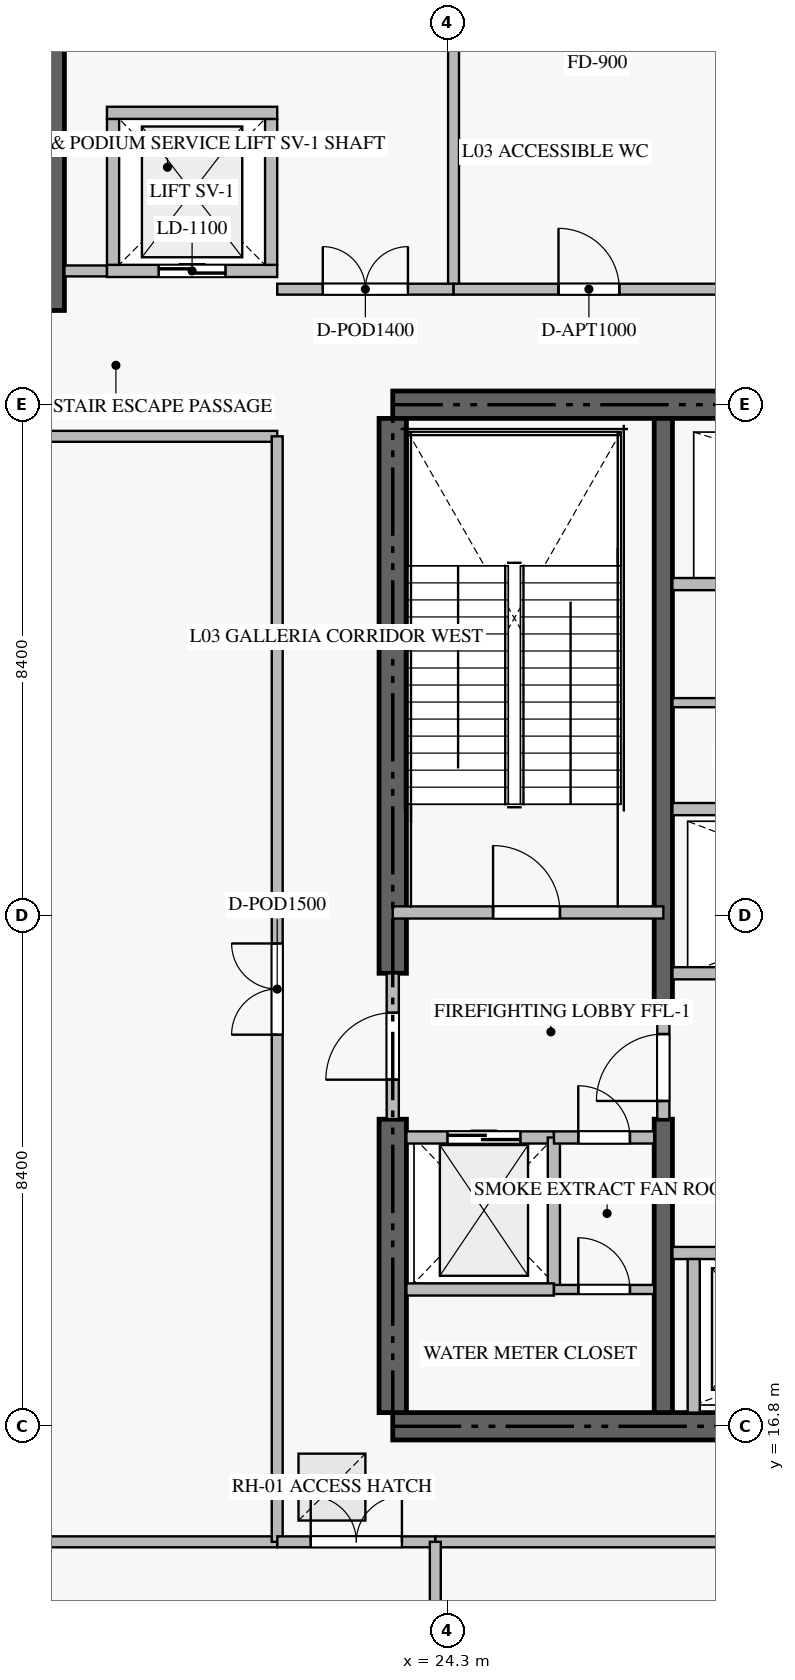
"""IFC4 building model, lengths in metres.
Left out: names, types, materials, properties, quantities, classifications, styles, units other than length and angle.
Written with IfcOpenShell. Run it as: python <this file> out.ifc"""

import sys

from ifc_helpers import new_model, si_unit, direction, frame, frame_2d, origin, origin_2d, place, context, subcontext, project, spatial, rectangle, extrude, source, transform, mapped, element, fill, save


model = new_model("IFC4")
c1 = context("Model", 3, precision=1e-05, world=origin(), true_north=direction((0.0, 1.0)))
c2 = subcontext(c1, "Body", "Model", "MODEL_VIEW")
j1 = project(units=[si_unit("LENGTHUNIT", "METRE"), si_unit("PLANEANGLEUNIT", "RADIAN")], contexts=[c1])
p1 = place(None, origin())
s1 = spatial("IfcSite", under=j1, at=p1, CompositionType="ELEMENT")
p2 = place(p1, origin())
s2 = spatial("IfcBuilding", under=s1, at=p2, CompositionType="ELEMENT")
p3 = place(p2, frame((0.0, 0.0, 15.3)))
s3 = spatial("IfcBuildingStorey", under=s2, at=p3, CompositionType="ELEMENT", Elevation=15.3)
for number, where, z_axis, x_axis in (
    (1, (23.4, 16.8, -0.38), (0.0, 0.0, 1.0), (1.0, 0.0, 0.0)),
    (2, (41.4, 33.6, -0.38), (0.0, 0.0, 1.0), (-1.0, 0.0, 0.0)),
):
    element("IfcWall", number, at=place(p3, frame(where, z_axis=z_axis, x_axis=x_axis)), inside=s3, PredefinedType="SHEAR", context=c2, shape_type="SweptSolid", body=[
        extrude(rectangle(XDim=18.0, YDim=0.45, at=frame_2d((9.0, 0.0))), origin(), (0.0, 0.0, 1.0), 5.228),
    ])
p4 = place(p3, frame((23.4, 17.025, -0.38), z_axis=(0.0, 0.0, 1.0), x_axis=(0.0, 1.0, 0.0)))
e3 = element("IfcWall", 3, at=p4, inside=s3, PredefinedType="SHEAR", context=c2, shape_type="SweptSolid", body=[
    extrude(rectangle(XDim=4.825, YDim=0.45, at=frame_2d((2.413, 0.0))), origin(), (0.0, 0.0, 1.0), 5.228),
])
p5 = place(p3, frame((23.4, 24.25, -0.38), z_axis=(0.0, 0.0, 1.0), x_axis=(0.0, 1.0, 0.0)))
e4 = element("IfcWall", 4, at=p5, inside=s3, PredefinedType="SHEAR", context=c2, shape_type="SweptSolid", body=[
    extrude(rectangle(XDim=9.125, YDim=0.45, at=frame_2d((4.562, 0.0))), origin(), (0.0, 0.0, 1.0), 5.228),
])
p6 = place(p3, frame((27.85, 17.025, -0.38), z_axis=(0.0, 0.0, 1.0), x_axis=(0.0, 1.0, 0.0)))
e5 = element("IfcWall", 5, at=p6, inside=s3, PredefinedType="SHEAR", context=c2, shape_type="SweptSolid", body=[
    extrude(rectangle(XDim=4.825, YDim=0.3, at=frame_2d((2.413, 0.0))), origin(), (0.0, 0.0, 1.0), 5.228),
])
p7 = place(p3, frame((27.85, 23.55, -0.38), z_axis=(0.0, 0.0, 1.0), x_axis=(0.0, 1.0, 0.0)))
e6 = element("IfcWall", 6, at=p7, inside=s3, PredefinedType="SHEAR", context=c2, shape_type="SweptSolid", body=[
    extrude(rectangle(XDim=9.825, YDim=0.3, at=frame_2d((4.913, 0.0))), origin(), (0.0, 0.0, 1.0), 5.228),
])
p8 = place(p3, frame((23.4, 25.25, 0.0), z_axis=(0.0, 0.0, 1.0), x_axis=(1.0, 0.0, 0.0)))
e7 = element("IfcWall", 7, at=p8, inside=s3, PredefinedType="STANDARD", context=c2, shape_type="SweptSolid", body=[
    extrude(rectangle(XDim=4.45, YDim=0.2, at=frame_2d((2.225, 0.0))), origin(), (0.0, 0.0, 1.0), 4.85),
])
p9 = place(p8, frame((1.65, 0.0, 0.0)))
e8 = element("IfcOpeningElement", 8, at=p9, cuts=e7, PredefinedType="OPENING", context=c2, shape_type="SweptSolid", body=[
    extrude(rectangle(XDim=1.1, YDim=2.15, at=frame_2d((0.55, 1.075))), frame((0.0, 0.11, 0.0), z_axis=(0.0, -1.0, 0.0), x_axis=(1.0, 0.0, 0.0)), (0.0, 0.0, 1.0), 0.22),
])
p10 = place(p3, frame((17.85, 35.15, -0.38), z_axis=(0.0, 0.0, 1.0), x_axis=(0.0, 1.0, 0.0)))
e9 = element("IfcWall", 9, at=p10, inside=s3, PredefinedType="SHEAR", context=c2, shape_type="SweptSolid", body=[
    extrude(rectangle(XDim=7.9, YDim=0.3, at=frame_2d((3.95, 0.0))), origin(), (0.0, 0.0, 1.0), 5.228),
])
p11 = place(p3, frame((23.625, 21.55, 0.0), z_axis=(0.0, 0.0, 1.0), x_axis=(1.0, 0.0, 0.0)))
e10 = element("IfcWall", 10, at=p11, inside=s3, PredefinedType="STANDARD", context=c2, shape_type="SweptSolid", body=[
    extrude(rectangle(XDim=2.425, YDim=0.2, at=frame_2d((1.212, 0.0))), origin(), (0.0, 0.0, 1.0), 4.85),
])
p12 = place(p11, frame((0.675, 0.0, 0.0)))
e11 = element("IfcOpeningElement", 11, at=p12, cuts=e10, PredefinedType="OPENING", context=c2, shape_type="SweptSolid", body=[
    extrude(rectangle(XDim=1.2, YDim=2.2, at=frame_2d((0.6, 1.1))), frame((0.0, 0.11, 0.0), z_axis=(0.0, -1.0, 0.0), x_axis=(1.0, 0.0, 0.0)), (0.0, 0.0, 1.0), 0.22),
])
p13 = place(p3, frame((28.0, 19.65, 0.0), z_axis=(0.0, 0.0, 1.0), x_axis=(1.0, 0.0, 0.0)))
e12 = element("IfcWall", 12, at=p13, inside=s3, PredefinedType="STANDARD", context=c2, shape_type="SweptSolid", body=[
    extrude(rectangle(XDim=2.65, YDim=0.2, at=frame_2d((1.325, 0.0))), origin(), (0.0, 0.0, 1.0), 4.85),
])
p14 = place(p13, frame((0.9, 0.0, 0.0)))
e13 = element("IfcOpeningElement", 13, at=p14, cuts=e12, PredefinedType="OPENING", context=c2, shape_type="SweptSolid", body=[
    extrude(rectangle(XDim=1.1, YDim=2.2, at=frame_2d((0.55, 1.1))), frame((0.0, 0.11, 0.0), z_axis=(0.0, -1.0, 0.0), x_axis=(1.0, 0.0, 0.0)), (0.0, 0.0, 1.0), 0.22),
])
p15 = place(p3, frame((28.35, 17.025, 0.0), z_axis=(0.0, 0.0, 1.0), x_axis=(0.0, 1.0, 0.0)))
e14 = element("IfcWall", 14, at=p15, inside=s3, PredefinedType="STANDARD", context=c2, shape_type="SweptSolid", body=[
    extrude(rectangle(XDim=2.525, YDim=0.2, at=frame_2d((1.263, 0.0))), origin(), (0.0, 0.0, 1.0), 4.85),
])
p16 = place(p3, frame((28.0, 24.25, 0.0), z_axis=(0.0, 0.0, 1.0), x_axis=(1.0, 0.0, 0.0)))
e15 = element("IfcWall", 15, at=p16, inside=s3, PredefinedType="STANDARD", context=c2, shape_type="SweptSolid", body=[
    extrude(rectangle(XDim=2.425, YDim=0.2, at=frame_2d((1.212, 0.0))), origin(), (0.0, 0.0, 1.0), 4.85),
])
p17 = place(p3, frame((28.0, 30.65, 0.0), z_axis=(0.0, 0.0, 1.0), x_axis=(1.0, 0.0, 0.0)))
e16 = element("IfcWall", 16, at=p17, inside=s3, PredefinedType="STANDARD", context=c2, shape_type="SweptSolid", body=[
    extrude(rectangle(XDim=2.55, YDim=0.2, at=frame_2d((1.275, 0.0))), origin(), (0.0, 0.0, 1.0), 4.85),
])
p18 = place(p3, frame((18.7, 35.8, 0.0), z_axis=(0.0, 0.0, 1.0), x_axis=(1.0, 0.0, 0.0)))
e17 = element("IfcWall", 17, at=p18, inside=s3, PredefinedType="STANDARD", context=c2, shape_type="SweptSolid", body=[
    extrude(rectangle(XDim=2.8, YDim=0.2, at=frame_2d((1.4, 0.0))), origin(), (0.0, 0.0, 1.0), 4.85),
])
p19 = place(p18, frame((0.85, 0.0, 0.0)))
e18 = element("IfcOpeningElement", 18, at=p19, cuts=e17, PredefinedType="OPENING", context=c2, shape_type="SweptSolid", body=[
    extrude(rectangle(XDim=1.1, YDim=2.2, at=frame_2d((0.55, 1.1))), frame((0.0, 0.11, 0.0), z_axis=(0.0, -1.0, 0.0), x_axis=(1.0, 0.0, 0.0)), (0.0, 0.0, 1.0), 0.22),
])
for number, where, z_axis, x_axis in (
    (19, (18.8, 35.9, 0.0), (0.0, 0.0, 1.0), (0.0, 1.0, 0.0)),
    (20, (21.4, 35.9, 0.0), (0.0, 0.0, 1.0), (0.0, 1.0, 0.0)),
):
    element("IfcWall", number, at=place(p3, frame(where, z_axis=z_axis, x_axis=x_axis)), inside=s3, PredefinedType="STANDARD", context=c2, shape_type="SweptSolid", body=[
        extrude(rectangle(XDim=2.4, YDim=0.2, at=frame_2d((1.2, 0.0))), origin(), (0.0, 0.0, 1.0), 4.85),
    ])
p20 = place(p3, frame((18.7, 38.4, 0.0), z_axis=(0.0, 0.0, 1.0), x_axis=(1.0, 0.0, 0.0)))
e21 = element("IfcWall", 21, at=p20, inside=s3, PredefinedType="STANDARD", context=c2, shape_type="SweptSolid", body=[
    extrude(rectangle(XDim=2.8, YDim=0.2, at=frame_2d((1.4, 0.0))), origin(), (0.0, 0.0, 1.0), 4.85),
])
p21 = place(p3, frame((26.05, 19.05, 0.0), z_axis=(0.0, 0.0, 1.0), x_axis=(0.0, 1.0, 0.0)))
e22 = element("IfcWall", 22, at=p21, inside=s3, PredefinedType="STANDARD", context=c2, shape_type="SweptSolid", body=[
    extrude(rectangle(XDim=2.5, YDim=0.2, at=frame_2d((1.25, 0.0))), origin(), (0.0, 0.0, 1.0), 4.85),
])
p22 = place(p3, frame((23.625, 19.05, 0.0), z_axis=(0.0, 0.0, 1.0), x_axis=(1.0, 0.0, 0.0)))
e23 = element("IfcWall", 23, at=p22, inside=s3, PredefinedType="STANDARD", context=c2, shape_type="SweptSolid", body=[
    extrude(rectangle(XDim=2.425, YDim=0.2, at=frame_2d((1.212, 0.0))), origin(), (0.0, 0.0, 1.0), 4.85),
])
p23 = place(p3, frame((26.052, 21.55, 0.0), z_axis=(0.0, 0.0, 1.0), x_axis=(1.0, 0.0, 0.0)))
e24 = element("IfcWall", 24, at=p23, inside=s3, PredefinedType="STANDARD", context=c2, shape_type="SweptSolid", body=[
    extrude(rectangle(XDim=1.648, YDim=0.2, at=frame_2d((0.824, 0.0))), origin(), (0.0, 0.0, 1.0), 4.85),
])
p24 = place(p23, frame((0.399, 0.0, 0.0)))
e25 = element("IfcOpeningElement", 25, at=p24, cuts=e24, PredefinedType="OPENING", context=c2, shape_type="SweptSolid", body=[
    extrude(rectangle(XDim=0.85, YDim=2.1, at=frame_2d((0.425, 1.05))), frame((0.0, 0.11, 0.0), z_axis=(0.0, -1.0, 0.0), x_axis=(1.0, 0.0, 0.0)), (0.0, 0.0, 1.0), 0.22),
])
p25 = place(p3, frame((23.4, 21.852, 0.0), z_axis=(0.0, 0.0, 1.0), x_axis=(0.0, 1.0, 0.0)))
e26 = element("IfcWall", 26, at=p25, inside=s3, PredefinedType="STANDARD", context=c2, shape_type="SweptSolid", body=[
    extrude(rectangle(XDim=2.396, YDim=0.2, at=frame_2d((1.198, 0.0))), origin(), (0.0, 0.0, 1.0), 4.85),
])
p26 = place(p25, frame((0.648, 0.0, 0.0)))
e27 = element("IfcOpeningElement", 27, at=p26, cuts=e26, PredefinedType="OPENING", context=c2, shape_type="SweptSolid", body=[
    extrude(rectangle(XDim=1.1, YDim=2.15, at=frame_2d((0.55, 1.075))), frame((0.0, 0.11, 0.0), z_axis=(0.0, -1.0, 0.0), x_axis=(1.0, 0.0, 0.0)), (0.0, 0.0, 1.0), 0.22),
])
p27 = place(p3, frame((27.85, 21.852, 0.0), z_axis=(0.0, 0.0, 1.0), x_axis=(0.0, 1.0, 0.0)))
e28 = element("IfcWall", 28, at=p27, inside=s3, PredefinedType="STANDARD", context=c2, shape_type="SweptSolid", body=[
    extrude(rectangle(XDim=1.696, YDim=0.2, at=frame_2d((0.848, 0.0))), origin(), (0.0, 0.0, 1.0), 4.85),
])
p28 = place(p27, frame((0.298, 0.0, 0.0)))
e29 = element("IfcOpeningElement", 29, at=p28, cuts=e28, PredefinedType="OPENING", context=c2, shape_type="SweptSolid", body=[
    extrude(rectangle(XDim=1.1, YDim=2.15, at=frame_2d((0.55, 1.075))), frame((0.0, 0.11, 0.0), z_axis=(0.0, -1.0, 0.0), x_axis=(1.0, 0.0, 0.0)), (0.0, 0.0, 1.0), 0.22),
])
p29 = place(p3, frame((28.0, 26.95, 0.0), z_axis=(0.0, 0.0, 1.0), x_axis=(1.0, 0.0, 0.0)))
e30 = element("IfcWall", 30, at=p29, inside=s3, PredefinedType="STANDARD", context=c2, shape_type="SweptSolid", body=[
    extrude(rectangle(XDim=6.95, YDim=0.2, at=frame_2d((3.475, 0.0))), origin(), (0.0, 0.0, 1.0), 4.85),
])
p30 = place(p3, frame((26.052, 19.05, 0.0), z_axis=(0.0, 0.0, 1.0), x_axis=(1.0, 0.0, 0.0)))
e31 = element("IfcWall", 31, at=p30, inside=s3, PredefinedType="PARTITIONING", context=c2, shape_type="SweptSolid", body=[
    extrude(rectangle(XDim=1.648, YDim=0.15, at=frame_2d((0.824, 0.0))), origin(), (0.0, 0.0, 1.0), 4.85),
])
p31 = place(p30, frame((0.399, 0.0, 0.0)))
e32 = element("IfcOpeningElement", 32, at=p31, cuts=e31, PredefinedType="OPENING", context=c2, shape_type="SweptSolid", body=[
    extrude(rectangle(XDim=0.85, YDim=2.1, at=frame_2d((0.425, 1.05))), frame((0.0, 0.085, 0.0), z_axis=(0.0, -1.0, 0.0), x_axis=(1.0, 0.0, 0.0)), (0.0, 0.0, 1.0), 0.17),
])
p32 = place(p3, frame((28.0, 28.7, 0.0), z_axis=(0.0, 0.0, 1.0), x_axis=(1.0, 0.0, 0.0)))
e33 = element("IfcWall", 33, at=p32, inside=s3, PredefinedType="PARTITIONING", context=c2, shape_type="SweptSolid", body=[
    extrude(rectangle(XDim=6.95, YDim=0.15, at=frame_2d((3.475, 0.0))), origin(), (0.0, 0.0, 1.0), 4.85),
])
p33 = place(p3, frame((4.132, 14.9, 0.0), z_axis=(0.0, 0.0, 1.0), x_axis=(1.0, 0.0, 0.0)))
e34 = element("IfcWall", 34, at=p33, inside=s3, PredefinedType="PARTITIONING", context=c2, shape_type="SweptSolid", body=[
    extrude(rectangle(XDim=17.368, YDim=0.18, at=frame_2d((8.684, 0.0))), origin(), (0.0, 0.0, 1.0), 4.85),
])
p34 = place(p3, frame((14.08, 33.08, 0.0), z_axis=(0.0, 0.0, 1.0), x_axis=(1.0, 0.0, 0.0)))
e35 = element("IfcWall", 35, at=p34, inside=s3, PredefinedType="PARTITIONING", context=c2, shape_type="SweptSolid", body=[
    extrude(rectangle(XDim=7.42, YDim=0.18, at=frame_2d((3.71, 0.0))), origin(), (0.0, 0.0, 1.0), 4.85),
])
p35 = place(p3, frame((18.0, 35.8, 0.0), z_axis=(0.0, 0.0, 1.0), x_axis=(1.0, 0.0, 0.0)))
e36 = element("IfcWall", 36, at=p35, inside=s3, PredefinedType="PARTITIONING", context=c2, shape_type="SweptSolid", body=[
    extrude(rectangle(XDim=0.698, YDim=0.18, at=frame_2d((0.349, 0.0))), origin(), (0.0, 0.0, 1.0), 4.85),
])
p36 = place(p3, frame((21.5, 14.9, 0.0), z_axis=(0.0, 0.0, 1.0), x_axis=(0.0, 1.0, 0.0)))
e37 = element("IfcWall", 37, at=p36, inside=s3, PredefinedType="PARTITIONING", context=c2, shape_type="SweptSolid", body=[
    extrude(rectangle(XDim=18.18, YDim=0.18, at=frame_2d((9.09, 0.0))), origin(), (0.0, 0.0, 1.0), 4.85),
])
p37 = place(p36, frame((8.34, 0.0, 0.0)))
e38 = element("IfcOpeningElement", 38, at=p37, cuts=e37, PredefinedType="OPENING", context=c2, shape_type="SweptSolid", body=[
    extrude(rectangle(XDim=1.5, YDim=2.25, at=frame_2d((0.75, 1.125))), frame((0.0, 0.1, 0.0), z_axis=(0.0, -1.0, 0.0), x_axis=(1.0, 0.0, 0.0)), (0.0, 0.0, 1.0), 0.2),
])
p38 = place(p3, frame((24.4, 35.5, 0.0), z_axis=(0.0, 0.0, 1.0), x_axis=(0.0, 1.0, 0.0)))
e39 = element("IfcWall", 39, at=p38, inside=s3, PredefinedType="PARTITIONING", context=c2, shape_type="SweptSolid", body=[
    extrude(rectangle(XDim=10.618, YDim=0.18, at=frame_2d((5.309, 0.0))), origin(), (0.0, 0.0, 1.0), 4.85),
])
p39 = place(p3, frame((21.502, 14.9, 0.0), z_axis=(0.0, 0.0, 1.0), x_axis=(1.0, 0.0, 0.0)))
e40 = element("IfcWall", 40, at=p39, inside=s3, PredefinedType="PARTITIONING", context=c2, shape_type="SweptSolid", body=[
    extrude(rectangle(XDim=2.598, YDim=0.18, at=frame_2d((1.299, 0.0))), origin(), (0.0, 0.0, 1.0), 4.85),
])
p40 = place(p39, frame((0.549, 0.0, 0.0)))
e41 = element("IfcOpeningElement", 41, at=p40, cuts=e40, PredefinedType="OPENING", context=c2, shape_type="SweptSolid", body=[
    extrude(rectangle(XDim=1.5, YDim=2.25, at=frame_2d((0.75, 1.125))), frame((0.0, 0.1, 0.0), z_axis=(0.0, -1.0, 0.0), x_axis=(1.0, 0.0, 0.0)), (0.0, 0.0, 1.0), 0.2),
])
p41 = place(p3, frame((24.102, 14.9, 0.0), z_axis=(0.0, 0.0, 1.0), x_axis=(1.0, 0.0, 0.0)))
e42 = element("IfcWall", 42, at=p41, inside=s3, PredefinedType="PARTITIONING", context=c2, shape_type="SweptSolid", body=[
    extrude(rectangle(XDim=11.098, YDim=0.18, at=frame_2d((5.549, 0.0))), origin(), (0.0, 0.0, 1.0), 4.85),
])
p42 = place(p41, frame((4.749, 0.0, 0.0)))
e43 = element("IfcOpeningElement", 43, at=p42, cuts=e42, PredefinedType="OPENING", context=c2, shape_type="SweptSolid", body=[
    extrude(rectangle(XDim=1.6, YDim=2.3, at=frame_2d((0.8, 1.15))), frame((0.0, 0.1, 0.0), z_axis=(0.0, -1.0, 0.0), x_axis=(1.0, 0.0, 0.0)), (0.0, 0.0, 1.0), 0.2),
])
p43 = place(p3, frame((21.5, 35.5, 0.0), z_axis=(0.0, 0.0, 1.0), x_axis=(1.0, 0.0, 0.0)))
e44 = element("IfcWall", 44, at=p43, inside=s3, PredefinedType="PARTITIONING", context=c2, shape_type="SweptSolid", body=[
    extrude(rectangle(XDim=2.9, YDim=0.18, at=frame_2d((1.45, 0.0))), origin(), (0.0, 0.0, 1.0), 4.85),
])
p44 = place(p43, frame((0.75, 0.0, 0.0)))
e45 = element("IfcOpeningElement", 45, at=p44, cuts=e44, PredefinedType="OPENING", context=c2, shape_type="SweptSolid", body=[
    extrude(rectangle(XDim=1.4, YDim=2.25, at=frame_2d((0.7, 1.125))), frame((0.0, 0.1, 0.0), z_axis=(0.0, -1.0, 0.0), x_axis=(1.0, 0.0, 0.0)), (0.0, 0.0, 1.0), 0.2),
])
p45 = place(p3, frame((24.402, 35.5, 0.0), z_axis=(0.0, 0.0, 1.0), x_axis=(1.0, 0.0, 0.0)))
e46 = element("IfcWall", 46, at=p45, inside=s3, PredefinedType="PARTITIONING", context=c2, shape_type="SweptSolid", body=[
    extrude(rectangle(XDim=4.448, YDim=0.18, at=frame_2d((2.224, 0.0))), origin(), (0.0, 0.0, 1.0), 4.85),
])
p46 = place(p45, frame((1.724, 0.0, 0.0)))
e47 = element("IfcOpeningElement", 47, at=p46, cuts=e46, PredefinedType="OPENING", context=c2, shape_type="SweptSolid", body=[
    extrude(rectangle(XDim=1.0, YDim=2.15, at=frame_2d((0.5, 1.075))), frame((0.0, 0.1, 0.0), z_axis=(0.0, -1.0, 0.0), x_axis=(1.0, 0.0, 0.0)), (0.0, 0.0, 1.0), 0.2),
])
p47 = place(p3, frame((24.1, 4.282, 0.0), z_axis=(0.0, 0.0, 1.0), x_axis=(0.0, 1.0, 0.0)))
e48 = element("IfcWall", 48, at=p47, inside=s3, PredefinedType="PARTITIONING", context=c2, shape_type="SweptSolid", body=[
    extrude(rectangle(XDim=10.618, YDim=0.18, at=frame_2d((5.309, 0.0))), origin(), (0.0, 0.0, 1.0), 4.85),
])
p48 = place(p2, frame((0.0, 0.0, 21.0)))
p49 = place(p48, frame((0.0, 0.0, -0.85)))
p50 = place(p49, frame((22.4, 15.8, 0.0)))
p51 = place(p50, frame((0.0, 0.0, 0.81)))
e49 = element("IfcDoor", 49, at=p51, inside=s3, OperationType="SINGLE_SWING_LEFT", PredefinedType="TRAPDOOR", context=c2, shape_type="SweptSolid", body=[
    extrude(rectangle(XDim=1.1, YDim=1.1, at=origin_2d()), origin(), (0.0, 0.0, 1.0), 0.04),
])
m1 = source(origin(), c2, "Body", "SweptSolid", [
    extrude(rectangle(XDim=1.1, YDim=2.15, at=frame_2d((0.55, 1.075))), frame((0.0, 0.025, 0.0), z_axis=(0.0, -1.0, 0.0), x_axis=(1.0, 0.0, 0.0)), (0.0, 0.0, 1.0), 0.05),
])
p52 = place(p9, origin())
e50 = element("IfcDoor", 50, at=p52, inside=s3, OperationType="SINGLE_SWING_LEFT", PredefinedType="DOOR", context=c2, shape_type="MappedRepresentation", body=[
    mapped(m1, transform((0.0, 0.0, 0.0), scale=1.0)),
])
fill(e8, e50)
m2 = source(origin(), c2, "Body", "SweptSolid", [
    extrude(rectangle(XDim=1.2, YDim=2.2, at=frame_2d((0.6, 1.1))), frame((0.0, 0.025, 0.0), z_axis=(0.0, -1.0, 0.0), x_axis=(1.0, 0.0, 0.0)), (0.0, 0.0, 1.0), 0.05),
])
p53 = place(p12, origin())
e51 = element("IfcDoor", 51, at=p53, inside=s3, OperationType="DOUBLE_DOOR_SLIDING", PredefinedType="DOOR", context=c2, shape_type="MappedRepresentation", body=[
    mapped(m2, transform((0.0, 0.0, 0.0), scale=1.0)),
])
fill(e11, e51)
m3 = source(origin(), c2, "Body", "SweptSolid", [
    extrude(rectangle(XDim=1.1, YDim=2.2, at=frame_2d((0.55, 1.1))), frame((0.0, 0.025, 0.0), z_axis=(0.0, -1.0, 0.0), x_axis=(1.0, 0.0, 0.0)), (0.0, 0.0, 1.0), 0.05),
])
p54 = place(p19, origin())
e52 = element("IfcDoor", 52, at=p54, inside=s3, OperationType="DOUBLE_DOOR_SLIDING", PredefinedType="DOOR", context=c2, shape_type="MappedRepresentation", body=[
    mapped(m3, transform((0.0, 0.0, 0.0), scale=1.0)),
])
fill(e18, e52)
m4 = source(origin(), c2, "Body", "SweptSolid", [
    extrude(rectangle(XDim=0.85, YDim=2.1, at=frame_2d((0.425, 1.05))), frame((0.0, 0.025, 0.0), z_axis=(0.0, -1.0, 0.0), x_axis=(1.0, 0.0, 0.0)), (0.0, 0.0, 1.0), 0.05),
])
p55 = place(p24, origin())
e53 = element("IfcDoor", 53, at=p55, inside=s3, OperationType="SINGLE_SWING_LEFT", PredefinedType="DOOR", context=c2, shape_type="MappedRepresentation", body=[
    mapped(m4, transform((0.0, 0.0, 0.0), scale=1.0)),
])
fill(e25, e53)
p56 = place(p26, origin())
e54 = element("IfcDoor", 54, at=p56, inside=s3, OperationType="SINGLE_SWING_LEFT", PredefinedType="DOOR", context=c2, shape_type="MappedRepresentation", body=[
    mapped(m1, transform((0.0, 0.0, 0.0), scale=1.0)),
])
fill(e27, e54)
p57 = place(p28, origin())
e55 = element("IfcDoor", 55, at=p57, inside=s3, OperationType="SINGLE_SWING_LEFT", PredefinedType="DOOR", context=c2, shape_type="MappedRepresentation", body=[
    mapped(m1, transform((0.0, 0.0, 0.0), scale=1.0)),
])
fill(e29, e55)
p58 = place(p31, origin())
e56 = element("IfcDoor", 56, at=p58, inside=s3, OperationType="SINGLE_SWING_LEFT", PredefinedType="DOOR", context=c2, shape_type="MappedRepresentation", body=[
    mapped(m4, transform((0.0, 0.0, 0.0), scale=1.0)),
])
fill(e32, e56)
m5 = source(origin(), c2, "Body", "SweptSolid", [
    extrude(rectangle(XDim=1.5, YDim=2.25, at=frame_2d((0.75, 1.125))), frame((0.0, 0.025, 0.0), z_axis=(0.0, -1.0, 0.0), x_axis=(1.0, 0.0, 0.0)), (0.0, 0.0, 1.0), 0.05),
])
p59 = place(p37, origin())
e57 = element("IfcDoor", 57, at=p59, inside=s3, OperationType="DOUBLE_DOOR_SINGLE_SWING", PredefinedType="DOOR", context=c2, shape_type="MappedRepresentation", body=[
    mapped(m5, transform((0.0, 0.0, 0.0), scale=1.0)),
])
fill(e38, e57)
p60 = place(p40, origin())
e58 = element("IfcDoor", 58, at=p60, inside=s3, OperationType="DOUBLE_DOOR_SINGLE_SWING", PredefinedType="DOOR", context=c2, shape_type="MappedRepresentation", body=[
    mapped(m5, transform((0.0, 0.0, 0.0), scale=1.0)),
])
fill(e41, e58)
m6 = source(origin(), c2, "Body", "SweptSolid", [
    extrude(rectangle(XDim=1.4, YDim=2.25, at=frame_2d((0.7, 1.125))), frame((0.0, 0.025, 0.0), z_axis=(0.0, -1.0, 0.0), x_axis=(1.0, 0.0, 0.0)), (0.0, 0.0, 1.0), 0.05),
])
p61 = place(p44, origin())
e59 = element("IfcDoor", 59, at=p61, inside=s3, OperationType="DOUBLE_DOOR_SINGLE_SWING", PredefinedType="DOOR", context=c2, shape_type="MappedRepresentation", body=[
    mapped(m6, transform((0.0, 0.0, 0.0), scale=1.0)),
])
fill(e45, e59)
m7 = source(origin(), c2, "Body", "SweptSolid", [
    extrude(rectangle(XDim=1.0, YDim=2.15, at=frame_2d((0.5, 1.075))), frame((0.0, 0.025, 0.0), z_axis=(0.0, -1.0, 0.0), x_axis=(1.0, 0.0, 0.0)), (0.0, 0.0, 1.0), 0.05),
])
p62 = place(p46, origin())
e60 = element("IfcDoor", 60, at=p62, inside=s3, OperationType="SINGLE_SWING_LEFT", PredefinedType="DOOR", context=c2, shape_type="MappedRepresentation", body=[
    mapped(m7, transform((0.0, 0.0, 0.0), scale=1.0)),
])
fill(e47, e60)
save(model, sys.argv[1])
